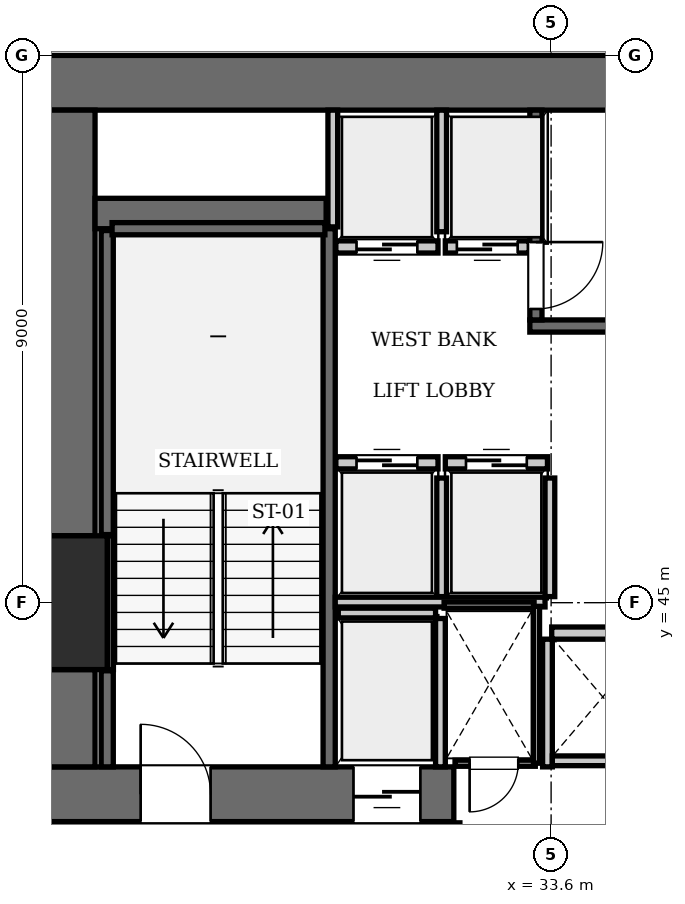
"""IFC4 building model, lengths in metres.
Left out: names, types, materials, properties, quantities, classifications, styles, units other than length and angle.
Written with IfcOpenShell. Run it as: python <this file> out.ifc"""

import sys

from ifc_helpers import new_model, si_unit, direction, frame, frame_2d, origin, origin_2d, place, context, subcontext, project, spatial, rectangle, extrude, element, fill, save


model = new_model("IFC4")
c1 = context("Model", 3, precision=1e-05, world=origin(), true_north=direction((0.0, 1.0)))
c2 = subcontext(c1, "Body", "Model", "MODEL_VIEW")
j1 = project(units=[si_unit("LENGTHUNIT", "METRE"), si_unit("PLANEANGLEUNIT", "RADIAN")], contexts=[c1])
p1 = place(None, origin())
s1 = spatial("IfcSite", under=j1, at=p1, CompositionType="ELEMENT")
p2 = place(p1, origin())
s2 = spatial("IfcBuilding", under=s1, at=p2, CompositionType="ELEMENT")
p3 = place(p2, frame((0.0, 0.0, 88.55)))
s3 = spatial("IfcBuildingStorey", under=s2, at=p3, CompositionType="ELEMENT", Elevation=88.55)
p4 = place(p3, frame((25.2, 45.0, 0.0), z_axis=(0.0, 0.0, 1.0), x_axis=(1.0, 0.0, 0.0)))
e1 = element("IfcColumn", 1, at=p4, inside=s3, PredefinedType="COLUMN", context=c2, shape_type="SweptSolid", body=[
    extrude(rectangle(XDim=2.2, YDim=2.2, at=origin_2d()), origin(), (0.0, 0.0, 1.0), 3.85),
])
p5 = place(p3, frame((25.2, 53.55, 0.0), z_axis=(0.0, 0.0, 1.0), x_axis=(1.0, 0.0, 0.0)))
e2 = element("IfcWall", 2, at=p5, inside=s3, PredefinedType="SHEAR", context=c2, shape_type="SweptSolid", body=[
    extrude(rectangle(XDim=25.2, YDim=0.9, at=frame_2d((12.6, 0.0))), origin(), (0.0, 0.0, 1.0), 3.85),
])
p6 = place(p3, frame((25.2, 41.85, 0.0), z_axis=(0.0, 0.0, 1.0), x_axis=(1.0, 0.0, 0.0)))
e3 = element("IfcWall", 3, at=p6, inside=s3, PredefinedType="SHEAR", context=c2, shape_type="SweptSolid", body=[
    extrude(rectangle(XDim=6.8, YDim=0.9, at=frame_2d((3.4, 0.0))), origin(), (0.0, 0.0, 1.0), 3.85),
])
p7 = place(p6, frame((1.65, 0.0, 0.0)))
e4 = element("IfcOpeningElement", 4, at=p7, cuts=e3, PredefinedType="OPENING", context=c2, shape_type="SweptSolid", body=[
    extrude(rectangle(XDim=1.15, YDim=2.15, at=frame_2d((0.575, 1.075))), frame((0.0, 0.46, 0.0), z_axis=(0.0, -1.0, 0.0), x_axis=(1.0, 0.0, 0.0)), (0.0, 0.0, 1.0), 0.92),
])
p8 = place(p6, frame((5.15, 0.0, 0.0)))
e5 = element("IfcOpeningElement", 5, at=p8, cuts=e3, PredefinedType="OPENING", context=c2, shape_type="SweptSolid", body=[
    extrude(rectangle(XDim=1.1, YDim=2.2, at=frame_2d((0.55, 1.1))), frame((0.0, 0.46, 0.0), z_axis=(0.0, -1.0, 0.0), x_axis=(1.0, 0.0, 0.0)), (0.0, 0.0, 1.0), 0.92),
])
p9 = place(p3, frame((25.65, 42.3, 0.0), z_axis=(0.0, 0.0, 1.0), x_axis=(0.0, 1.0, 0.0)))
e6 = element("IfcWall", 6, at=p9, inside=s3, PredefinedType="SHEAR", context=c2, shape_type="SweptSolid", body=[
    extrude(rectangle(XDim=1.6, YDim=0.9, at=frame_2d((0.8, 0.0))), origin(), (0.0, 0.0, 1.0), 3.85),
])
p10 = place(p3, frame((25.65, 46.1, 0.0), z_axis=(0.0, 0.0, 1.0), x_axis=(0.0, 1.0, 0.0)))
e7 = element("IfcWall", 7, at=p10, inside=s3, PredefinedType="SHEAR", context=c2, shape_type="SweptSolid", body=[
    extrude(rectangle(XDim=7.0, YDim=0.9, at=frame_2d((3.5, 0.0))), origin(), (0.0, 0.0, 1.0), 3.85),
])
p11 = place(p3, frame((26.1, 51.4, 0.0), z_axis=(0.0, 0.0, 1.0), x_axis=(1.0, 0.0, 0.0)))
e8 = element("IfcWall", 8, at=p11, inside=s3, PredefinedType="SHEAR", context=c2, shape_type="SweptSolid", body=[
    extrude(rectangle(XDim=3.8, YDim=0.5, at=frame_2d((1.9, 0.0))), origin(), (0.0, 0.0, 1.0), 3.85),
])
p12 = place(p3, frame((29.95, 42.3, 0.0), z_axis=(0.0, 0.0, 1.0), x_axis=(0.0, 1.0, 0.0)))
e9 = element("IfcWall", 9, at=p12, inside=s3, PredefinedType="SOLIDWALL", context=c2, shape_type="SweptSolid", body=[
    extrude(rectangle(XDim=8.85, YDim=0.2, at=frame_2d((4.425, 0.0))), origin(), (0.0, 0.0, 1.0), 3.61),
])
p13 = place(p3, frame((26.3, 42.3, 0.0), z_axis=(0.0, 0.0, 1.0), x_axis=(0.0, 1.0, 0.0)))
e10 = element("IfcWall", 10, at=p13, inside=s3, PredefinedType="SOLIDWALL", context=c2, shape_type="SweptSolid", body=[
    extrude(rectangle(XDim=1.58, YDim=0.2, at=frame_2d((0.79, 0.0))), origin(), (0.0, 0.0, 1.0), 3.61),
])
p14 = place(p3, frame((26.3, 46.12, 0.0), z_axis=(0.0, 0.0, 1.0), x_axis=(0.0, 1.0, 0.0)))
e11 = element("IfcWall", 11, at=p14, inside=s3, PredefinedType="SOLIDWALL", context=c2, shape_type="SweptSolid", body=[
    extrude(rectangle(XDim=5.0, YDim=0.2, at=frame_2d((2.5, 0.0))), origin(), (0.0, 0.0, 1.0), 3.61),
])
p15 = place(p3, frame((26.38, 51.15, 0.0), z_axis=(0.0, 0.0, 1.0), x_axis=(1.0, 0.0, 0.0)))
e12 = element("IfcWall", 12, at=p15, inside=s3, PredefinedType="SOLIDWALL", context=c2, shape_type="SweptSolid", body=[
    extrude(rectangle(XDim=3.5, YDim=0.2, at=frame_2d((1.75, 0.0))), origin(), (0.0, 0.0, 1.0), 3.61),
])
p16 = place(p3, frame((26.352, 43.9, 0.0), z_axis=(0.0, 0.0, 1.0), x_axis=(0.0, 1.0, 0.0)))
e13 = element("IfcWall", 13, at=p16, inside=s3, PredefinedType="SOLIDWALL", context=c2, shape_type="SweptSolid", body=[
    extrude(rectangle(XDim=2.2, YDim=0.1, at=frame_2d((1.1, 0.0))), origin(), (0.0, 0.0, 1.0), 3.61),
])
p17 = place(p3, frame((33.25, 49.55, 0.0), z_axis=(0.0, 0.0, 1.0), x_axis=(1.0, 0.0, 0.0)))
e14 = element("IfcWall", 14, at=p17, inside=s3, PredefinedType="SOLIDWALL", context=c2, shape_type="SweptSolid", body=[
    extrude(rectangle(XDim=9.1, YDim=0.2, at=frame_2d((4.55, 0.0))), origin(), (0.0, 0.0, 1.0), 3.61),
])
p18 = place(p3, frame((33.35, 49.65, 0.0), z_axis=(0.0, 0.0, 1.0), x_axis=(0.0, 1.0, 0.0)))
e15 = element("IfcWall", 15, at=p18, inside=s3, PredefinedType="SOLIDWALL", context=c2, shape_type="SweptSolid", body=[
    extrude(rectangle(XDim=3.45, YDim=0.2, at=frame_2d((1.725, 0.0))), origin(), (0.0, 0.0, 1.0), 3.61),
])
p19 = place(p18, frame((0.18, 0.0, 0.0)))
e16 = element("IfcOpeningElement", 16, at=p19, cuts=e15, PredefinedType="OPENING", context=c2, shape_type="SweptSolid", body=[
    extrude(rectangle(XDim=1.1, YDim=2.15, at=frame_2d((0.55, 1.075))), frame((0.0, 0.11, 0.0), z_axis=(0.0, -1.0, 0.0), x_axis=(1.0, 0.0, 0.0)), (0.0, 0.0, 1.0), 0.22),
])
p20 = place(p3, frame((30.06, 47.3, 0.0), z_axis=(0.0, 0.0, 1.0), x_axis=(1.0, 0.0, 0.0)))
e17 = element("IfcWall", 17, at=p20, inside=s3, PredefinedType="SOLIDWALL", context=c2, shape_type="SweptSolid", body=[
    extrude(rectangle(XDim=1.68, YDim=0.2, at=frame_2d((0.84, 0.0))), origin(), (0.0, 0.0, 1.0), 3.61),
])
p21 = place(p20, frame((0.34, 0.0, 0.0)))
e18 = element("IfcOpeningElement", 18, at=p21, cuts=e17, PredefinedType="OPENING", context=c2, shape_type="SweptSolid", body=[
    extrude(rectangle(XDim=1.0, YDim=2.15, at=frame_2d((0.5, 1.075))), frame((0.0, 0.11, 0.0), z_axis=(0.0, -1.0, 0.0), x_axis=(1.0, 0.0, 0.0)), (0.0, 0.0, 1.0), 0.22),
])
p22 = place(p3, frame((31.86, 47.3, 0.0), z_axis=(0.0, 0.0, 1.0), x_axis=(1.0, 0.0, 0.0)))
e19 = element("IfcWall", 19, at=p22, inside=s3, PredefinedType="SOLIDWALL", context=c2, shape_type="SweptSolid", body=[
    extrude(rectangle(XDim=1.68, YDim=0.2, at=frame_2d((0.84, 0.0))), origin(), (0.0, 0.0, 1.0), 3.61),
])
p23 = place(p22, frame((0.34, 0.0, 0.0)))
e20 = element("IfcOpeningElement", 20, at=p23, cuts=e19, PredefinedType="OPENING", context=c2, shape_type="SweptSolid", body=[
    extrude(rectangle(XDim=1.0, YDim=2.15, at=frame_2d((0.5, 1.075))), frame((0.0, 0.11, 0.0), z_axis=(0.0, -1.0, 0.0), x_axis=(1.0, 0.0, 0.0)), (0.0, 0.0, 1.0), 0.22),
])
p24 = place(p3, frame((30.06, 50.85, 0.0), z_axis=(0.0, 0.0, 1.0), x_axis=(1.0, 0.0, 0.0)))
e21 = element("IfcWall", 21, at=p24, inside=s3, PredefinedType="SOLIDWALL", context=c2, shape_type="SweptSolid", body=[
    extrude(rectangle(XDim=1.68, YDim=0.2, at=frame_2d((0.84, 0.0))), origin(), (0.0, 0.0, 1.0), 3.61),
])
p25 = place(p24, frame((0.34, 0.0, 0.0)))
e22 = element("IfcOpeningElement", 22, at=p25, cuts=e21, PredefinedType="OPENING", context=c2, shape_type="SweptSolid", body=[
    extrude(rectangle(XDim=1.0, YDim=2.15, at=frame_2d((0.5, 1.075))), frame((0.0, 0.11, 0.0), z_axis=(0.0, -1.0, 0.0), x_axis=(1.0, 0.0, 0.0)), (0.0, 0.0, 1.0), 0.22),
])
p26 = place(p3, frame((31.86, 50.85, 0.0), z_axis=(0.0, 0.0, 1.0), x_axis=(1.0, 0.0, 0.0)))
e23 = element("IfcWall", 23, at=p26, inside=s3, PredefinedType="SOLIDWALL", context=c2, shape_type="SweptSolid", body=[
    extrude(rectangle(XDim=1.38, YDim=0.2, at=frame_2d((0.69, 0.0))), origin(), (0.0, 0.0, 1.0), 3.61),
])
p27 = place(p26, frame((0.19, 0.0, 0.0)))
e24 = element("IfcOpeningElement", 24, at=p27, cuts=e23, PredefinedType="OPENING", context=c2, shape_type="SweptSolid", body=[
    extrude(rectangle(XDim=1.0, YDim=2.15, at=frame_2d((0.5, 1.075))), frame((0.0, 0.11, 0.0), z_axis=(0.0, -1.0, 0.0), x_axis=(1.0, 0.0, 0.0)), (0.0, 0.0, 1.0), 0.22),
])
p28 = place(p3, frame((33.61, 44.5, 0.0), z_axis=(0.0, 0.0, 1.0), x_axis=(1.0, 0.0, 0.0)))
e25 = element("IfcWall", 25, at=p28, inside=s3, PredefinedType="SOLIDWALL", context=c2, shape_type="SweptSolid", body=[
    extrude(rectangle(XDim=1.68, YDim=0.2, at=frame_2d((0.84, 0.0))), origin(), (0.0, 0.0, 1.0), 3.61),
])
p29 = place(p3, frame((30.1, 44.83, 0.0), z_axis=(0.0, 0.0, 1.0), x_axis=(1.0, 0.0, 0.0)))
e26 = element("IfcWall", 26, at=p29, inside=s3, PredefinedType="SOLIDWALL", context=c2, shape_type="SweptSolid", body=[
    extrude(rectangle(XDim=1.6, YDim=0.16, at=frame_2d((0.8, 0.0))), origin(), (0.0, 0.0, 1.0), 3.61),
])
p30 = place(p3, frame((31.78, 42.3, 0.0), z_axis=(0.0, 0.0, 1.0), x_axis=(0.0, 1.0, 0.0)))
e27 = element("IfcWall", 27, at=p30, inside=s3, PredefinedType="SOLIDWALL", context=c2, shape_type="SweptSolid", body=[
    extrude(rectangle(XDim=2.44, YDim=0.16, at=frame_2d((1.22, 0.0))), origin(), (0.0, 0.0, 1.0), 3.61),
])
for number, where, z_axis, x_axis in (
    (28, (31.8, 45.1, 0.0), (0.0, 0.0, 1.0), (0.0, 1.0, 0.0)),
    (29, (33.58, 45.1, 0.0), (0.0, 0.0, 1.0), (0.0, 1.0, 0.0)),
):
    element("IfcWall", number, at=place(p3, frame(where, z_axis=z_axis, x_axis=x_axis)), inside=s3, PredefinedType="SOLIDWALL", context=c2, shape_type="SweptSolid", body=[
        extrude(rectangle(XDim=1.95, YDim=0.16, at=frame_2d((0.975, 0.0))), origin(), (0.0, 0.0, 1.0), 3.61),
    ])
p31 = place(p3, frame((30.05, 45.01, 0.0), z_axis=(0.0, 0.0, 1.0), x_axis=(1.0, 0.0, 0.0)))
e30 = element("IfcWall", 30, at=p31, inside=s3, PredefinedType="SOLIDWALL", context=c2, shape_type="SweptSolid", body=[
    extrude(rectangle(XDim=3.45, YDim=0.16, at=frame_2d((1.725, 0.0))), origin(), (0.0, 0.0, 1.0), 3.61),
])
p32 = place(p3, frame((30.01, 51.18, 0.0), z_axis=(0.0, 0.0, 1.0), x_axis=(0.0, 1.0, 0.0)))
e31 = element("IfcWall", 31, at=p32, inside=s3, PredefinedType="SOLIDWALL", context=c2, shape_type="SweptSolid", body=[
    extrude(rectangle(XDim=1.92, YDim=0.16, at=frame_2d((0.96, 0.0))), origin(), (0.0, 0.0, 1.0), 3.61),
])
p33 = place(p3, frame((31.8, 51.1, 0.0), z_axis=(0.0, 0.0, 1.0), x_axis=(0.0, 1.0, 0.0)))
e32 = element("IfcWall", 32, at=p33, inside=s3, PredefinedType="SOLIDWALL", context=c2, shape_type="SweptSolid", body=[
    extrude(rectangle(XDim=2.0, YDim=0.16, at=frame_2d((1.0, 0.0))), origin(), (0.0, 0.0, 1.0), 3.61),
])
p34 = place(p3, frame((33.54, 42.3, 0.0), z_axis=(0.0, 0.0, 1.0), x_axis=(0.0, 1.0, 0.0)))
e33 = element("IfcWall", 33, at=p34, inside=s3, PredefinedType="SOLIDWALL", context=c2, shape_type="SweptSolid", body=[
    extrude(rectangle(XDim=2.1, YDim=0.16, at=frame_2d((1.05, 0.0))), origin(), (0.0, 0.0, 1.0), 3.61),
])
p35 = place(p3, frame((33.62, 42.4, 0.0), z_axis=(0.0, 0.0, 1.0), x_axis=(1.0, 0.0, 0.0)))
e34 = element("IfcWall", 34, at=p35, inside=s3, PredefinedType="SOLIDWALL", context=c2, shape_type="SweptSolid", body=[
    extrude(rectangle(XDim=1.66, YDim=0.16, at=frame_2d((0.83, 0.0))), origin(), (0.0, 0.0, 1.0), 3.61),
])
for number, where, z_axis, x_axis in (
    (35, (26.2, 38.31, 0.0), (0.0, 0.0, 1.0), (0.0, 1.0, 0.0)),
    (36, (32.0, 38.31, 0.0), (0.0, 0.0, 1.0), (0.0, 1.0, 0.0)),
):
    element("IfcWall", number, at=place(p3, frame(where, z_axis=z_axis, x_axis=x_axis)), inside=s3, PredefinedType="PARTITIONING", context=c2, shape_type="SweptSolid", body=[
        extrude(rectangle(XDim=3.07, YDim=0.2, at=frame_2d((1.535, 0.0))), origin(), (0.0, 0.0, 1.0), 3.61),
    ])
p36 = place(p3, frame((32.02, 42.36, 0.0), z_axis=(0.0, 0.0, 1.0), x_axis=(1.0, 0.0, 0.0)))
e37 = element("IfcWall", 37, at=p36, inside=s3, PredefinedType="PARTITIONING", context=c2, shape_type="SweptSolid", body=[
    extrude(rectangle(XDim=1.32, YDim=0.1, at=frame_2d((0.66, 0.0))), origin(), (0.0, 0.0, 1.0), 3.61),
])
p37 = place(p36, frame((0.24, 0.0, 0.0)))
e38 = element("IfcOpeningElement", 38, at=p37, cuts=e37, PredefinedType="OPENING", context=c2, shape_type="SweptSolid", body=[
    extrude(rectangle(XDim=0.8, YDim=2.05, at=frame_2d((0.4, 1.025))), frame((0.0, 0.06, 0.0), z_axis=(0.0, -1.0, 0.0), x_axis=(1.0, 0.0, 0.0)), (0.0, 0.0, 1.0), 0.12),
])
p38 = place(p3, frame((31.84, 44.96, 0.0), z_axis=(0.0, 0.0, 1.0), x_axis=(1.0, 0.0, 0.0)))
e39 = element("IfcWall", 39, at=p38, inside=s3, PredefinedType="PARTITIONING", context=c2, shape_type="SweptSolid", body=[
    extrude(rectangle(XDim=1.48, YDim=0.1, at=frame_2d((0.74, 0.0))), origin(), (0.0, 0.0, 1.0), 3.61),
])
p39 = place(p3, frame((33.36, 42.36, 0.0), z_axis=(0.0, 0.0, 1.0), x_axis=(0.0, 1.0, 0.0)))
e40 = element("IfcWall", 40, at=p39, inside=s3, PredefinedType="PARTITIONING", context=c2, shape_type="SweptSolid", body=[
    extrude(rectangle(XDim=2.58, YDim=0.1, at=frame_2d((1.29, 0.0))), origin(), (0.0, 0.0, 1.0), 3.61),
])
p40 = place(p7, origin())
e41 = element("IfcDoor", 41, at=p40, inside=s3, OperationType="SINGLE_SWING_LEFT", PredefinedType="DOOR", context=c2, shape_type="SweptSolid", body=[
    extrude(rectangle(XDim=1.15, YDim=2.15, at=frame_2d((0.575, 1.075))), frame((0.0, 0.025, 0.0), z_axis=(0.0, -1.0, 0.0), x_axis=(1.0, 0.0, 0.0)), (0.0, 0.0, 1.0), 0.05),
])
fill(e4, e41)
p41 = place(p19, frame((1.1, 0.0, 0.0), z_axis=(0.0, 0.0, 1.0), x_axis=(-1.0, 0.0, 0.0)))
e42 = element("IfcDoor", 42, at=p41, inside=s3, OperationType="SINGLE_SWING_LEFT", PredefinedType="DOOR", context=c2, shape_type="SweptSolid", body=[
    extrude(rectangle(XDim=1.1, YDim=2.15, at=frame_2d((0.55, 1.075))), frame((0.0, 0.025, 0.0), z_axis=(0.0, -1.0, 0.0), x_axis=(1.0, 0.0, 0.0)), (0.0, 0.0, 1.0), 0.05),
])
fill(e16, e42)
p42 = place(p21, origin())
e43 = element("IfcDoor", 43, at=p42, inside=s3, OperationType="SLIDING_TO_LEFT", PredefinedType="DOOR", context=c2, shape_type="SweptSolid", body=[
    extrude(rectangle(XDim=1.0, YDim=2.15, at=frame_2d((0.5, 1.075))), frame((0.0, 0.025, 0.0), z_axis=(0.0, -1.0, 0.0), x_axis=(1.0, 0.0, 0.0)), (0.0, 0.0, 1.0), 0.05),
])
fill(e18, e43)
p43 = place(p23, origin())
e44 = element("IfcDoor", 44, at=p43, inside=s3, OperationType="SLIDING_TO_LEFT", PredefinedType="DOOR", context=c2, shape_type="SweptSolid", body=[
    extrude(rectangle(XDim=1.0, YDim=2.15, at=frame_2d((0.5, 1.075))), frame((0.0, 0.025, 0.0), z_axis=(0.0, -1.0, 0.0), x_axis=(1.0, 0.0, 0.0)), (0.0, 0.0, 1.0), 0.05),
])
fill(e20, e44)
p44 = place(p25, frame((1.0, 0.0, 0.0), z_axis=(0.0, 0.0, 1.0), x_axis=(-1.0, 0.0, 0.0)))
e45 = element("IfcDoor", 45, at=p44, inside=s3, OperationType="SLIDING_TO_LEFT", PredefinedType="DOOR", context=c2, shape_type="SweptSolid", body=[
    extrude(rectangle(XDim=1.0, YDim=2.15, at=frame_2d((0.5, 1.075))), frame((0.0, 0.025, 0.0), z_axis=(0.0, -1.0, 0.0), x_axis=(1.0, 0.0, 0.0)), (0.0, 0.0, 1.0), 0.05),
])
fill(e22, e45)
p45 = place(p27, frame((1.0, 0.0, 0.0), z_axis=(0.0, 0.0, 1.0), x_axis=(-1.0, 0.0, 0.0)))
e46 = element("IfcDoor", 46, at=p45, inside=s3, OperationType="SLIDING_TO_LEFT", PredefinedType="DOOR", context=c2, shape_type="SweptSolid", body=[
    extrude(rectangle(XDim=1.0, YDim=2.15, at=frame_2d((0.5, 1.075))), frame((0.0, 0.025, 0.0), z_axis=(0.0, -1.0, 0.0), x_axis=(1.0, 0.0, 0.0)), (0.0, 0.0, 1.0), 0.05),
])
fill(e24, e46)
p46 = place(p8, frame((1.1, 0.0, 0.0), z_axis=(0.0, 0.0, 1.0), x_axis=(-1.0, 0.0, 0.0)))
e47 = element("IfcDoor", 47, at=p46, inside=s3, OperationType="SLIDING_TO_LEFT", PredefinedType="DOOR", context=c2, shape_type="SweptSolid", body=[
    extrude(rectangle(XDim=1.1, YDim=2.2, at=frame_2d((0.55, 1.1))), frame((0.0, 0.025, 0.0), z_axis=(0.0, -1.0, 0.0), x_axis=(1.0, 0.0, 0.0)), (0.0, 0.0, 1.0), 0.05),
])
fill(e5, e47)
p47 = place(p37, frame((0.8, 0.0, 0.0), z_axis=(0.0, 0.0, 1.0), x_axis=(-1.0, 0.0, 0.0)))
e48 = element("IfcDoor", 48, at=p47, inside=s3, OperationType="SINGLE_SWING_RIGHT", PredefinedType="DOOR", context=c2, shape_type="SweptSolid", body=[
    extrude(rectangle(XDim=0.8, YDim=2.05, at=frame_2d((0.4, 1.025))), frame((0.0, 0.025, 0.0), z_axis=(0.0, -1.0, 0.0), x_axis=(1.0, 0.0, 0.0)), (0.0, 0.0, 1.0), 0.05),
])
fill(e38, e48)
save(model, sys.argv[1])
